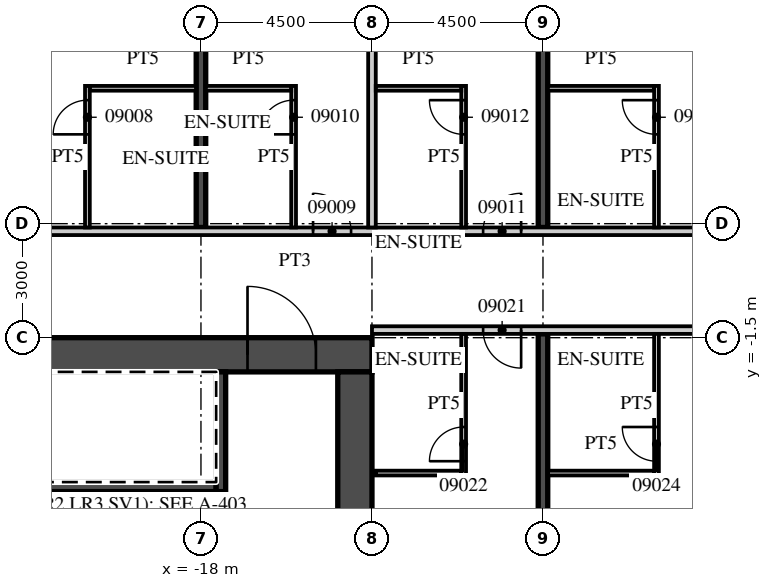
"""IFC4 building model, lengths in metres.
Left out: names, types, materials, properties, quantities, classifications, styles, units other than length and angle.
Written with IfcOpenShell. Run it as: python <this file> out.ifc"""

import sys

from ifc_helpers import new_model, si_unit, direction, frame, frame_2d, origin, place, context, subcontext, project, spatial, rectangle, extrude, element, fill, save


model = new_model("IFC4")
c1 = context("Model", 3, precision=1e-05, world=origin(), true_north=direction((0.0, 1.0)))
c2 = subcontext(c1, "Body", "Model", "MODEL_VIEW")
j1 = project(units=[si_unit("LENGTHUNIT", "METRE"), si_unit("PLANEANGLEUNIT", "RADIAN")], contexts=[c1])
p1 = place(None, origin())
s1 = spatial("IfcSite", under=j1, at=p1, CompositionType="ELEMENT")
p2 = place(p1, origin())
s2 = spatial("IfcBuilding", under=s1, at=p2, CompositionType="ELEMENT")
p3 = place(p2, frame((0.0, 0.0, 60.0)))
s3 = spatial("IfcBuildingStorey", under=s2, at=p3, CompositionType="ELEMENT", Elevation=60.0)
for number, where, z_axis, x_axis in (
    (1, (-18.0, 1.4, 0.0), (0.0, 0.0, 1.0), (0.0, 1.0, 0.0)),
    (2, (-9.0, -21.54, 0.0), (0.0, 0.0, 1.0), (0.0, 1.0, 0.0)),
    (3, (-9.0, 1.4, 0.0), (0.0, 0.0, 1.0), (0.0, 1.0, 0.0)),
):
    element("IfcWall", number, at=place(p3, frame(where, z_axis=z_axis, x_axis=x_axis)), inside=s3, PredefinedType="SHEAR", context=c2, shape_type="SweptSolid", body=[
        extrude(rectangle(XDim=20.14, YDim=0.25, at=frame_2d((10.07, 0.0))), origin(), (0.0, 0.0, 1.0), 3.3),
    ])
p4 = place(p3, frame((-44.55, 1.3, 0.0), z_axis=(0.0, 0.0, 1.0), x_axis=(1.0, 0.0, 0.0)))
e4 = element("IfcWall", 4, at=p4, inside=s3, PredefinedType="PARTITIONING", context=c2, shape_type="SweptSolid", body=[
    extrude(rectangle(XDim=58.05, YDim=0.2, at=frame_2d((29.025, 0.0))), origin(), (0.0, 0.0, 1.0), 3.02),
])
p5 = place(p4, frame((0.525, 0.0, 0.0)))
e5 = element("IfcOpeningElement", 5, at=p5, cuts=e4, PredefinedType="OPENING", context=c2, shape_type="SweptSolid", body=[
    extrude(rectangle(XDim=1.0, YDim=2.1, at=frame_2d((0.5, 1.05))), frame((0.0, 0.11, 0.0), z_axis=(0.0, -1.0, 0.0), x_axis=(1.0, 0.0, 0.0)), (0.0, 0.0, 1.0), 0.22),
])
p6 = place(p4, frame((6.975, 0.0, 0.0)))
e6 = element("IfcOpeningElement", 6, at=p6, cuts=e4, PredefinedType="OPENING", context=c2, shape_type="SweptSolid", body=[
    extrude(rectangle(XDim=1.0, YDim=2.1, at=frame_2d((0.5, 1.05))), frame((0.0, 0.11, 0.0), z_axis=(0.0, -1.0, 0.0), x_axis=(1.0, 0.0, 0.0)), (0.0, 0.0, 1.0), 0.22),
])
p7 = place(p4, frame((10.987, 0.0, 0.0)))
e7 = element("IfcOpeningElement", 7, at=p7, cuts=e4, PredefinedType="OPENING", context=c2, shape_type="SweptSolid", body=[
    extrude(rectangle(XDim=1.2, YDim=2.1, at=frame_2d((0.6, 1.05))), frame((0.0, 0.11, 0.0), z_axis=(0.0, -1.0, 0.0), x_axis=(1.0, 0.0, 0.0)), (0.0, 0.0, 1.0), 0.22),
])
p8 = place(p4, frame((19.987, 0.0, 0.0)))
e8 = element("IfcOpeningElement", 8, at=p8, cuts=e4, PredefinedType="OPENING", context=c2, shape_type="SweptSolid", body=[
    extrude(rectangle(XDim=1.2, YDim=2.1, at=frame_2d((0.6, 1.05))), frame((0.0, 0.11, 0.0), z_axis=(0.0, -1.0, 0.0), x_axis=(1.0, 0.0, 0.0)), (0.0, 0.0, 1.0), 0.22),
])
p9 = place(p4, frame((29.5, 0.0, 0.0)))
e9 = element("IfcOpeningElement", 9, at=p9, cuts=e4, PredefinedType="OPENING", context=c2, shape_type="SweptSolid", body=[
    extrude(rectangle(XDim=1.0, YDim=2.1, at=frame_2d((0.5, 1.05))), frame((0.0, 0.11, 0.0), z_axis=(0.0, -1.0, 0.0), x_axis=(1.0, 0.0, 0.0)), (0.0, 0.0, 1.0), 0.22),
])
p10 = place(p4, frame((33.975, 0.0, 0.0)))
e10 = element("IfcOpeningElement", 10, at=p10, cuts=e4, PredefinedType="OPENING", context=c2, shape_type="SweptSolid", body=[
    extrude(rectangle(XDim=1.0, YDim=2.1, at=frame_2d((0.5, 1.05))), frame((0.0, 0.11, 0.0), z_axis=(0.0, -1.0, 0.0), x_axis=(1.0, 0.0, 0.0)), (0.0, 0.0, 1.0), 0.22),
])
p11 = place(p4, frame((40.912, 0.0, 0.0)))
e11 = element("IfcOpeningElement", 11, at=p11, cuts=e4, PredefinedType="OPENING", context=c2, shape_type="SweptSolid", body=[
    extrude(rectangle(XDim=1.2, YDim=2.1, at=frame_2d((0.6, 1.05))), frame((0.0, 0.11, 0.0), z_axis=(0.0, -1.0, 0.0), x_axis=(1.0, 0.0, 0.0)), (0.0, 0.0, 1.0), 0.22),
])
p12 = place(p4, frame((47.5, 0.0, 0.0)))
e12 = element("IfcOpeningElement", 12, at=p12, cuts=e4, PredefinedType="OPENING", context=c2, shape_type="SweptSolid", body=[
    extrude(rectangle(XDim=1.0, YDim=2.1, at=frame_2d((0.5, 1.05))), frame((0.0, 0.11, 0.0), z_axis=(0.0, -1.0, 0.0), x_axis=(1.0, 0.0, 0.0)), (0.0, 0.0, 1.0), 0.22),
])
p13 = place(p4, frame((51.975, 0.0, 0.0)))
e13 = element("IfcOpeningElement", 13, at=p13, cuts=e4, PredefinedType="OPENING", context=c2, shape_type="SweptSolid", body=[
    extrude(rectangle(XDim=1.0, YDim=2.1, at=frame_2d((0.5, 1.05))), frame((0.0, 0.11, 0.0), z_axis=(0.0, -1.0, 0.0), x_axis=(1.0, 0.0, 0.0)), (0.0, 0.0, 1.0), 0.22),
])
p14 = place(p4, frame((56.475, 0.0, 0.0)))
e14 = element("IfcOpeningElement", 14, at=p14, cuts=e4, PredefinedType="OPENING", context=c2, shape_type="SweptSolid", body=[
    extrude(rectangle(XDim=1.0, YDim=2.1, at=frame_2d((0.5, 1.05))), frame((0.0, 0.11, 0.0), z_axis=(0.0, -1.0, 0.0), x_axis=(1.0, 0.0, 0.0)), (0.0, 0.0, 1.0), 0.22),
])
p15 = place(p3, frame((-20.988, 1.4, 0.0), z_axis=(0.0, 0.0, 1.0), x_axis=(0.0, 1.0, 0.0)))
e15 = element("IfcWall", 15, at=p15, inside=s3, PredefinedType="PARTITIONING", context=c2, shape_type="SweptSolid", body=[
    extrude(rectangle(XDim=3.725, YDim=0.125, at=frame_2d((1.863, 0.0))), origin(), (0.0, 0.0, 1.0), 3.02),
])
p16 = place(p15, frame((2.45, 0.0, 0.0)))
e16 = element("IfcOpeningElement", 16, at=p16, cuts=e15, PredefinedType="OPENING", context=c2, shape_type="SweptSolid", body=[
    extrude(rectangle(XDim=0.9, YDim=2.1, at=frame_2d((0.45, 1.05))), frame((0.0, 0.073, 0.0), z_axis=(0.0, -1.0, 0.0), x_axis=(1.0, 0.0, 0.0)), (0.0, 0.0, 1.0), 0.145),
])
p17 = place(p3, frame((-20.925, 5.062, 0.0), z_axis=(0.0, 0.0, 1.0), x_axis=(1.0, 0.0, 0.0)))
e17 = element("IfcWall", 17, at=p17, inside=s3, PredefinedType="PARTITIONING", context=c2, shape_type="SweptSolid", body=[
    extrude(rectangle(XDim=2.8, YDim=0.125, at=frame_2d((1.4, 0.0))), origin(), (0.0, 0.0, 1.0), 3.02),
])
p18 = place(p3, frame((-13.5, 1.4, 0.0), z_axis=(0.0, 0.0, 1.0), x_axis=(0.0, 1.0, 0.0)))
e18 = element("IfcWall", 18, at=p18, inside=s3, PredefinedType="PARTITIONING", context=c2, shape_type="SweptSolid", body=[
    extrude(rectangle(XDim=20.15, YDim=0.2, at=frame_2d((10.075, 0.0))), origin(), (0.0, 0.0, 1.0), 3.02),
])
p19 = place(p3, frame((-15.562, 1.4, 0.0), z_axis=(0.0, 0.0, 1.0), x_axis=(0.0, 1.0, 0.0)))
e19 = element("IfcWall", 19, at=p19, inside=s3, PredefinedType="PARTITIONING", context=c2, shape_type="SweptSolid", body=[
    extrude(rectangle(XDim=3.725, YDim=0.125, at=frame_2d((1.863, 0.0))), origin(), (0.0, 0.0, 1.0), 3.02),
])
p20 = place(p19, frame((2.45, 0.0, 0.0)))
e20 = element("IfcOpeningElement", 20, at=p20, cuts=e19, PredefinedType="OPENING", context=c2, shape_type="SweptSolid", body=[
    extrude(rectangle(XDim=0.9, YDim=2.1, at=frame_2d((0.45, 1.05))), frame((0.0, 0.073, 0.0), z_axis=(0.0, -1.0, 0.0), x_axis=(1.0, 0.0, 0.0)), (0.0, 0.0, 1.0), 0.145),
])
p21 = place(p3, frame((-17.875, 5.062, 0.0), z_axis=(0.0, 0.0, 1.0), x_axis=(1.0, 0.0, 0.0)))
e21 = element("IfcWall", 21, at=p21, inside=s3, PredefinedType="PARTITIONING", context=c2, shape_type="SweptSolid", body=[
    extrude(rectangle(XDim=2.25, YDim=0.125, at=frame_2d((1.125, 0.0))), origin(), (0.0, 0.0, 1.0), 3.02),
])
p22 = place(p3, frame((-11.088, 1.4, 0.0), z_axis=(0.0, 0.0, 1.0), x_axis=(0.0, 1.0, 0.0)))
e22 = element("IfcWall", 22, at=p22, inside=s3, PredefinedType="PARTITIONING", context=c2, shape_type="SweptSolid", body=[
    extrude(rectangle(XDim=3.725, YDim=0.125, at=frame_2d((1.863, 0.0))), origin(), (0.0, 0.0, 1.0), 3.02),
])
p23 = place(p22, frame((2.45, 0.0, 0.0)))
e23 = element("IfcOpeningElement", 23, at=p23, cuts=e22, PredefinedType="OPENING", context=c2, shape_type="SweptSolid", body=[
    extrude(rectangle(XDim=0.9, YDim=2.1, at=frame_2d((0.45, 1.05))), frame((0.0, 0.073, 0.0), z_axis=(0.0, -1.0, 0.0), x_axis=(1.0, 0.0, 0.0)), (0.0, 0.0, 1.0), 0.145),
])
p24 = place(p3, frame((-13.4, 5.062, 0.0), z_axis=(0.0, 0.0, 1.0), x_axis=(1.0, 0.0, 0.0)))
e24 = element("IfcWall", 24, at=p24, inside=s3, PredefinedType="PARTITIONING", context=c2, shape_type="SweptSolid", body=[
    extrude(rectangle(XDim=2.25, YDim=0.125, at=frame_2d((1.125, 0.0))), origin(), (0.0, 0.0, 1.0), 3.02),
])
p25 = place(p3, frame((-6.013, 1.4, 0.0), z_axis=(0.0, 0.0, 1.0), x_axis=(0.0, 1.0, 0.0)))
e25 = element("IfcWall", 25, at=p25, inside=s3, PredefinedType="PARTITIONING", context=c2, shape_type="SweptSolid", body=[
    extrude(rectangle(XDim=3.725, YDim=0.125, at=frame_2d((1.863, 0.0))), origin(), (0.0, 0.0, 1.0), 3.02),
])
p26 = place(p25, frame((2.45, 0.0, 0.0)))
e26 = element("IfcOpeningElement", 26, at=p26, cuts=e25, PredefinedType="OPENING", context=c2, shape_type="SweptSolid", body=[
    extrude(rectangle(XDim=0.9, YDim=2.1, at=frame_2d((0.45, 1.05))), frame((0.0, 0.073, 0.0), z_axis=(0.0, -1.0, 0.0), x_axis=(1.0, 0.0, 0.0)), (0.0, 0.0, 1.0), 0.145),
])
p27 = place(p3, frame((-8.875, 5.062, 0.0), z_axis=(0.0, 0.0, 1.0), x_axis=(1.0, 0.0, 0.0)))
e27 = element("IfcWall", 27, at=p27, inside=s3, PredefinedType="PARTITIONING", context=c2, shape_type="SweptSolid", body=[
    extrude(rectangle(XDim=2.8, YDim=0.125, at=frame_2d((1.4, 0.0))), origin(), (0.0, 0.0, 1.0), 3.02),
])
p28 = place(p3, frame((-13.5, -1.3, 0.0), z_axis=(0.0, 0.0, 1.0), x_axis=(1.0, 0.0, 0.0)))
e28 = element("IfcWall", 28, at=p28, inside=s3, PredefinedType="PARTITIONING", context=c2, shape_type="SweptSolid", body=[
    extrude(rectangle(XDim=58.05, YDim=0.2, at=frame_2d((29.025, 0.0))), origin(), (0.0, 0.0, 1.0), 3.02),
])
p29 = place(p28, frame((2.925, 0.0, 0.0)))
e29 = element("IfcOpeningElement", 29, at=p29, cuts=e28, PredefinedType="OPENING", context=c2, shape_type="SweptSolid", body=[
    extrude(rectangle(XDim=1.0, YDim=2.1, at=frame_2d((0.5, 1.05))), frame((0.0, 0.11, 0.0), z_axis=(0.0, -1.0, 0.0), x_axis=(1.0, 0.0, 0.0)), (0.0, 0.0, 1.0), 0.22),
])
p30 = place(p28, frame((9.863, 0.0, 0.0)))
e30 = element("IfcOpeningElement", 30, at=p30, cuts=e28, PredefinedType="OPENING", context=c2, shape_type="SweptSolid", body=[
    extrude(rectangle(XDim=1.2, YDim=2.1, at=frame_2d((0.6, 1.05))), frame((0.0, 0.11, 0.0), z_axis=(0.0, -1.0, 0.0), x_axis=(1.0, 0.0, 0.0)), (0.0, 0.0, 1.0), 0.22),
])
p31 = place(p28, frame((16.45, 0.0, 0.0)))
e31 = element("IfcOpeningElement", 31, at=p31, cuts=e28, PredefinedType="OPENING", context=c2, shape_type="SweptSolid", body=[
    extrude(rectangle(XDim=1.0, YDim=2.1, at=frame_2d((0.5, 1.05))), frame((0.0, 0.11, 0.0), z_axis=(0.0, -1.0, 0.0), x_axis=(1.0, 0.0, 0.0)), (0.0, 0.0, 1.0), 0.22),
])
p32 = place(p28, frame((18.55, 0.0, 0.0)))
e32 = element("IfcOpeningElement", 32, at=p32, cuts=e28, PredefinedType="OPENING", context=c2, shape_type="SweptSolid", body=[
    extrude(rectangle(XDim=1.0, YDim=2.1, at=frame_2d((0.5, 1.05))), frame((0.0, 0.11, 0.0), z_axis=(0.0, -1.0, 0.0), x_axis=(1.0, 0.0, 0.0)), (0.0, 0.0, 1.0), 0.22),
])
p33 = place(p28, frame((24.938, 0.0, 0.0)))
e33 = element("IfcOpeningElement", 33, at=p33, cuts=e28, PredefinedType="OPENING", context=c2, shape_type="SweptSolid", body=[
    extrude(rectangle(XDim=1.2, YDim=2.1, at=frame_2d((0.6, 1.05))), frame((0.0, 0.11, 0.0), z_axis=(0.0, -1.0, 0.0), x_axis=(1.0, 0.0, 0.0)), (0.0, 0.0, 1.0), 0.22),
])
p34 = place(p28, frame((33.938, 0.0, 0.0)))
e34 = element("IfcOpeningElement", 34, at=p34, cuts=e28, PredefinedType="OPENING", context=c2, shape_type="SweptSolid", body=[
    extrude(rectangle(XDim=1.2, YDim=2.1, at=frame_2d((0.6, 1.05))), frame((0.0, 0.11, 0.0), z_axis=(0.0, -1.0, 0.0), x_axis=(1.0, 0.0, 0.0)), (0.0, 0.0, 1.0), 0.22),
])
p35 = place(p28, frame((42.938, 0.0, 0.0)))
e35 = element("IfcOpeningElement", 35, at=p35, cuts=e28, PredefinedType="OPENING", context=c2, shape_type="SweptSolid", body=[
    extrude(rectangle(XDim=1.2, YDim=2.1, at=frame_2d((0.6, 1.05))), frame((0.0, 0.11, 0.0), z_axis=(0.0, -1.0, 0.0), x_axis=(1.0, 0.0, 0.0)), (0.0, 0.0, 1.0), 0.22),
])
p36 = place(p28, frame((52.425, 0.0, 0.0)))
e36 = element("IfcOpeningElement", 36, at=p36, cuts=e28, PredefinedType="OPENING", context=c2, shape_type="SweptSolid", body=[
    extrude(rectangle(XDim=1.0, YDim=2.1, at=frame_2d((0.5, 1.05))), frame((0.0, 0.11, 0.0), z_axis=(0.0, -1.0, 0.0), x_axis=(1.0, 0.0, 0.0)), (0.0, 0.0, 1.0), 0.22),
])
p37 = place(p28, frame((56.525, 0.0, 0.0)))
e37 = element("IfcOpeningElement", 37, at=p37, cuts=e28, PredefinedType="OPENING", context=c2, shape_type="SweptSolid", body=[
    extrude(rectangle(XDim=1.0, YDim=2.1, at=frame_2d((0.5, 1.05))), frame((0.0, 0.11, 0.0), z_axis=(0.0, -1.0, 0.0), x_axis=(1.0, 0.0, 0.0)), (0.0, 0.0, 1.0), 0.22),
])
p38 = place(p3, frame((-11.088, -5.125, 0.0), z_axis=(0.0, 0.0, 1.0), x_axis=(0.0, 1.0, 0.0)))
e38 = element("IfcWall", 38, at=p38, inside=s3, PredefinedType="PARTITIONING", context=c2, shape_type="SweptSolid", body=[
    extrude(rectangle(XDim=3.725, YDim=0.125, at=frame_2d((1.863, 0.0))), origin(), (0.0, 0.0, 1.0), 3.02),
])
p39 = place(p38, frame((0.375, 0.0, 0.0)))
e39 = element("IfcOpeningElement", 39, at=p39, cuts=e38, PredefinedType="OPENING", context=c2, shape_type="SweptSolid", body=[
    extrude(rectangle(XDim=0.9, YDim=2.1, at=frame_2d((0.45, 1.05))), frame((0.0, 0.073, 0.0), z_axis=(0.0, -1.0, 0.0), x_axis=(1.0, 0.0, 0.0)), (0.0, 0.0, 1.0), 0.145),
])
p40 = place(p3, frame((-13.4, -5.062, 0.0), z_axis=(0.0, 0.0, 1.0), x_axis=(1.0, 0.0, 0.0)))
e40 = element("IfcWall", 40, at=p40, inside=s3, PredefinedType="PARTITIONING", context=c2, shape_type="SweptSolid", body=[
    extrude(rectangle(XDim=2.25, YDim=0.125, at=frame_2d((1.125, 0.0))), origin(), (0.0, 0.0, 1.0), 3.02),
])
p41 = place(p3, frame((-6.013, -5.125, 0.0), z_axis=(0.0, 0.0, 1.0), x_axis=(0.0, 1.0, 0.0)))
e41 = element("IfcWall", 41, at=p41, inside=s3, PredefinedType="PARTITIONING", context=c2, shape_type="SweptSolid", body=[
    extrude(rectangle(XDim=3.725, YDim=0.125, at=frame_2d((1.863, 0.0))), origin(), (0.0, 0.0, 1.0), 3.02),
])
p42 = place(p41, frame((0.375, 0.0, 0.0)))
e42 = element("IfcOpeningElement", 42, at=p42, cuts=e41, PredefinedType="OPENING", context=c2, shape_type="SweptSolid", body=[
    extrude(rectangle(XDim=0.9, YDim=2.1, at=frame_2d((0.45, 1.05))), frame((0.0, 0.073, 0.0), z_axis=(0.0, -1.0, 0.0), x_axis=(1.0, 0.0, 0.0)), (0.0, 0.0, 1.0), 0.145),
])
p43 = place(p3, frame((-8.875, -5.062, 0.0), z_axis=(0.0, 0.0, 1.0), x_axis=(1.0, 0.0, 0.0)))
e43 = element("IfcWall", 43, at=p43, inside=s3, PredefinedType="PARTITIONING", context=c2, shape_type="SweptSolid", body=[
    extrude(rectangle(XDim=2.8, YDim=0.125, at=frame_2d((1.4, 0.0))), origin(), (0.0, 0.0, 1.0), 3.02),
])
p44 = place(p3, frame((-31.5, -1.95, 0.0), z_axis=(0.0, 0.0, 1.0), x_axis=(1.0, 0.0, 0.0)))
e44 = element("IfcWall", 44, at=p44, inside=s3, PredefinedType="SHEAR", context=c2, shape_type="SweptSolid", body=[
    extrude(rectangle(XDim=18.0, YDim=0.9, at=frame_2d((9.0, 0.0))), origin(), (0.0, 0.0, 1.0), 3.02),
])
p45 = place(p44, frame((14.725, 0.0, 0.0)))
e45 = element("IfcOpeningElement", 45, at=p45, cuts=e44, PredefinedType="OPENING", context=c2, shape_type="SweptSolid", body=[
    extrude(rectangle(XDim=1.8, YDim=2.1, at=frame_2d((0.9, 1.05))), frame((0.0, 0.46, 0.0), z_axis=(0.0, -1.0, 0.0), x_axis=(1.0, 0.0, 0.0)), (0.0, 0.0, 1.0), 0.92),
])
p46 = place(p3, frame((-13.95, -14.6, 0.0), z_axis=(0.0, 0.0, 1.0), x_axis=(0.0, 1.0, 0.0)))
e46 = element("IfcWall", 46, at=p46, inside=s3, PredefinedType="SHEAR", context=c2, shape_type="SweptSolid", body=[
    extrude(rectangle(XDim=12.2, YDim=0.9, at=frame_2d((6.1, 0.0))), origin(), (0.0, 0.0, 1.0), 3.02),
])
p47 = place(p3, frame((-30.6, -5.425, 0.0), z_axis=(0.0, 0.0, 1.0), x_axis=(1.0, 0.0, 0.0)))
e47 = element("IfcWall", 47, at=p47, inside=s3, PredefinedType="SHEAR", context=c2, shape_type="SweptSolid", body=[
    extrude(rectangle(XDim=13.0, YDim=0.25, at=frame_2d((6.5, 0.0))), origin(), (0.0, 0.0, 1.0), 3.02),
])
p48 = place(p3, frame((-17.475, -5.55, 0.0), z_axis=(0.0, 0.0, 1.0), x_axis=(0.0, 1.0, 0.0)))
e48 = element("IfcWall", 48, at=p48, inside=s3, PredefinedType="SHEAR", context=c2, shape_type="SweptSolid", body=[
    extrude(rectangle(XDim=3.15, YDim=0.25, at=frame_2d((1.575, 0.0))), origin(), (0.0, 0.0, 1.0), 3.02),
])
p49 = place(p16, origin())
e49 = element("IfcDoor", 49, at=p49, inside=s3, OperationType="SINGLE_SWING_LEFT", PredefinedType="DOOR", context=c2, shape_type="SweptSolid", body=[
    extrude(rectangle(XDim=0.9, YDim=2.1, at=frame_2d((0.45, 1.05))), frame((0.0, 0.025, 0.0), z_axis=(0.0, -1.0, 0.0), x_axis=(1.0, 0.0, 0.0)), (0.0, 0.0, 1.0), 0.05),
])
fill(e16, e49)
p50 = place(p9, origin())
e50 = element("IfcDoor", 50, at=p50, inside=s3, OperationType="SINGLE_SWING_LEFT", PredefinedType="DOOR", context=c2, shape_type="SweptSolid", body=[
    extrude(rectangle(XDim=1.0, YDim=2.1, at=frame_2d((0.5, 1.05))), frame((0.0, 0.025, 0.0), z_axis=(0.0, -1.0, 0.0), x_axis=(1.0, 0.0, 0.0)), (0.0, 0.0, 1.0), 0.05),
])
fill(e9, e50)
p51 = place(p20, origin())
e51 = element("IfcDoor", 51, at=p51, inside=s3, OperationType="SINGLE_SWING_LEFT", PredefinedType="DOOR", context=c2, shape_type="SweptSolid", body=[
    extrude(rectangle(XDim=0.9, YDim=2.1, at=frame_2d((0.45, 1.05))), frame((0.0, 0.025, 0.0), z_axis=(0.0, -1.0, 0.0), x_axis=(1.0, 0.0, 0.0)), (0.0, 0.0, 1.0), 0.05),
])
fill(e20, e51)
p52 = place(p10, origin())
e52 = element("IfcDoor", 52, at=p52, inside=s3, OperationType="SINGLE_SWING_RIGHT", PredefinedType="DOOR", context=c2, shape_type="SweptSolid", body=[
    extrude(rectangle(XDim=1.0, YDim=2.1, at=frame_2d((0.5, 1.05))), frame((0.0, 0.025, 0.0), z_axis=(0.0, -1.0, 0.0), x_axis=(1.0, 0.0, 0.0)), (0.0, 0.0, 1.0), 0.05),
])
fill(e10, e52)
p53 = place(p23, origin())
e53 = element("IfcDoor", 53, at=p53, inside=s3, OperationType="SINGLE_SWING_RIGHT", PredefinedType="DOOR", context=c2, shape_type="SweptSolid", body=[
    extrude(rectangle(XDim=0.9, YDim=2.1, at=frame_2d((0.45, 1.05))), frame((0.0, 0.025, 0.0), z_axis=(0.0, -1.0, 0.0), x_axis=(1.0, 0.0, 0.0)), (0.0, 0.0, 1.0), 0.05),
])
fill(e23, e53)
p54 = place(p26, origin())
e54 = element("IfcDoor", 54, at=p54, inside=s3, OperationType="SINGLE_SWING_RIGHT", PredefinedType="DOOR", context=c2, shape_type="SweptSolid", body=[
    extrude(rectangle(XDim=0.9, YDim=2.1, at=frame_2d((0.45, 1.05))), frame((0.0, 0.025, 0.0), z_axis=(0.0, -1.0, 0.0), x_axis=(1.0, 0.0, 0.0)), (0.0, 0.0, 1.0), 0.05),
])
fill(e26, e54)
p55 = place(p29, origin())
e55 = element("IfcDoor", 55, at=p55, inside=s3, OperationType="SINGLE_SWING_RIGHT", PredefinedType="DOOR", context=c2, shape_type="SweptSolid", body=[
    extrude(rectangle(XDim=1.0, YDim=2.1, at=frame_2d((0.5, 1.05))), frame((0.0, 0.025, 0.0), z_axis=(0.0, -1.0, 0.0), x_axis=(1.0, 0.0, 0.0)), (0.0, 0.0, 1.0), 0.05),
])
fill(e29, e55)
p56 = place(p39, origin())
e56 = element("IfcDoor", 56, at=p56, inside=s3, OperationType="SINGLE_SWING_LEFT", PredefinedType="DOOR", context=c2, shape_type="SweptSolid", body=[
    extrude(rectangle(XDim=0.9, YDim=2.1, at=frame_2d((0.45, 1.05))), frame((0.0, 0.025, 0.0), z_axis=(0.0, -1.0, 0.0), x_axis=(1.0, 0.0, 0.0)), (0.0, 0.0, 1.0), 0.05),
])
fill(e39, e56)
p57 = place(p42, origin())
e57 = element("IfcDoor", 57, at=p57, inside=s3, OperationType="SINGLE_SWING_RIGHT", PredefinedType="DOOR", context=c2, shape_type="SweptSolid", body=[
    extrude(rectangle(XDim=0.9, YDim=2.1, at=frame_2d((0.45, 1.05))), frame((0.0, 0.025, 0.0), z_axis=(0.0, -1.0, 0.0), x_axis=(1.0, 0.0, 0.0)), (0.0, 0.0, 1.0), 0.05),
])
fill(e42, e57)
p58 = place(p45, origin())
e58 = element("IfcDoor", 58, at=p58, inside=s3, OperationType="DOUBLE_DOOR_DOUBLE_SWING", PredefinedType="DOOR", context=c2, shape_type="SweptSolid", body=[
    extrude(rectangle(XDim=1.8, YDim=2.1, at=frame_2d((0.9, 1.05))), frame((0.0, 0.025, 0.0), z_axis=(0.0, -1.0, 0.0), x_axis=(1.0, 0.0, 0.0)), (0.0, 0.0, 1.0), 0.05),
])
fill(e45, e58)
save(model, sys.argv[1])
